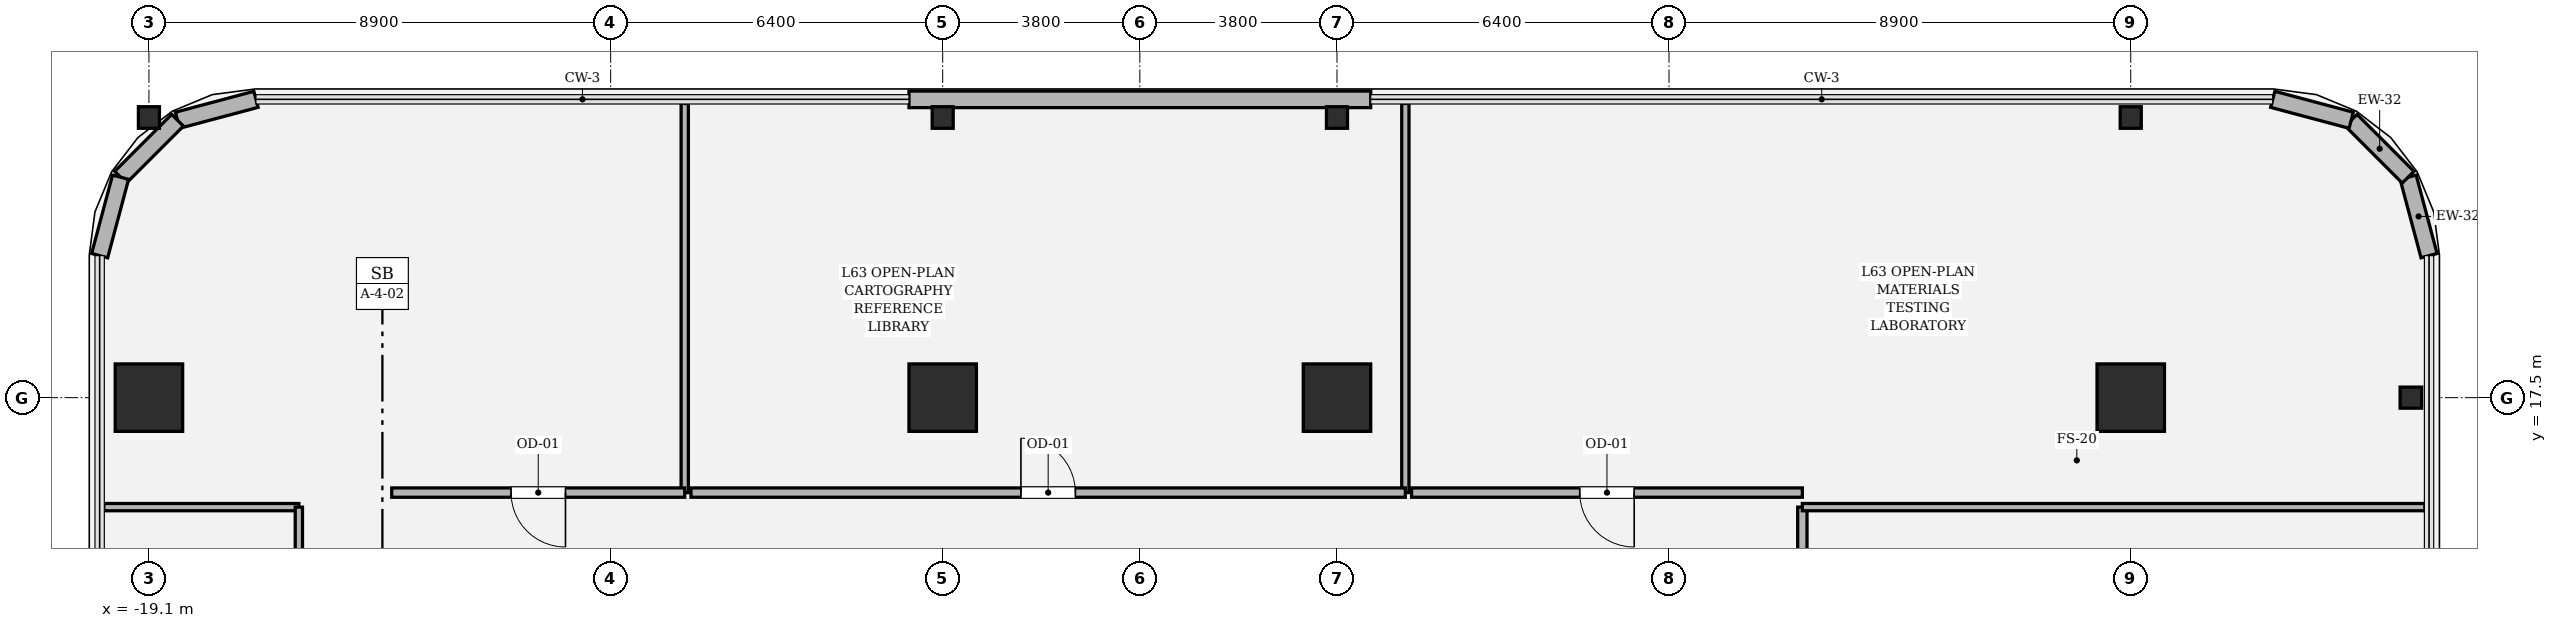
"""IFC4 building model, lengths in metres.
Left out: names, types, materials, properties, quantities, classifications, styles, units other than length and angle.
Written with IfcOpenShell. Run it as: python <this file> out.ifc"""

import sys

from ifc_helpers import new_model, si_unit, direction, frame, frame_2d, origin, origin_2d, place, context, subcontext, project, spatial, rectangle, hollow_rectangle, i_section, extrude, element, fill, save


model = new_model("IFC4")
c1 = context("Model", 3, precision=1e-05, world=origin(), true_north=direction((0.0, 1.0)))
c2 = subcontext(c1, "Body", "Model", "MODEL_VIEW")
j1 = project(units=[si_unit("LENGTHUNIT", "METRE"), si_unit("PLANEANGLEUNIT", "RADIAN")], contexts=[c1])
p1 = place(None, origin())
s1 = spatial("IfcSite", under=j1, at=p1, CompositionType="ELEMENT")
p2 = place(p1, origin())
s2 = spatial("IfcBuilding", under=s1, at=p2, CompositionType="ELEMENT")
p3 = place(p2, frame((0.0, 0.0, 267.6)))
s3 = spatial("IfcBuildingStorey", under=s2, at=p3, CompositionType="ELEMENT", Elevation=267.6)
for number, where, z_axis, x_axis in (
    (1, (19.1, 17.5, 0.0), (0.0, 0.0, 1.0), (1.0, 0.0, 0.0)),
    (2, (3.8, 17.5, 0.0), (0.0, 0.0, 1.0), (1.0, 0.0, 0.0)),
    (3, (-3.8, 17.5, 0.0), (0.0, 0.0, 1.0), (1.0, 0.0, 0.0)),
    (4, (-19.1, 17.5, 0.0), (0.0, 0.0, 1.0), (1.0, 0.0, 0.0)),
):
    element("IfcColumn", number, at=place(p3, frame(where, z_axis=z_axis, x_axis=x_axis)), inside=s3, PredefinedType="COLUMN", context=c2, shape_type="SweptSolid", body=[
        extrude(hollow_rectangle(XDim=1.3, YDim=1.3, WallThickness=0.038, at=origin_2d()), origin(), (0.0, 0.0, 1.0), 4.05),
    ])
for number, where, z_axis, x_axis in (
    (5, (-19.1, 22.9, 0.0), (0.0, 0.0, 1.0), (1.0, 0.0, 0.0)),
    (6, (-3.8, 22.9, 0.0), (0.0, 0.0, 1.0), (1.0, 0.0, 0.0)),
    (7, (3.8, 22.9, 0.0), (0.0, 0.0, 1.0), (1.0, 0.0, 0.0)),
    (8, (19.1, 22.9, 0.0), (0.0, 0.0, 1.0), (1.0, 0.0, 0.0)),
    (9, (24.5, 17.5, 0.0), (0.0, 0.0, 1.0), (0.0, 1.0, 0.0)),
):
    element("IfcColumn", number, at=place(p3, frame(where, z_axis=z_axis, x_axis=x_axis)), inside=s3, PredefinedType="COLUMN", context=c2, shape_type="SweptSolid", body=[
        extrude(i_section(OverallWidth=0.406, OverallDepth=0.416, WebThickness=0.029, FlangeThickness=0.048, FilletRadius=0.018, at=origin_2d()), origin(), (0.0, 0.0, 1.0), 4.048),
    ])
p4 = place(p3, frame((24.85, 20.237, 0.0), z_axis=(0.0, 0.0, 1.0), x_axis=(-0.257847112249, 0.966185730957, 0.0)))
e10 = element("IfcWall", 10, at=p4, inside=s3, PredefinedType="SOLIDWALL", context=c2, shape_type="SweptSolid", body=[
    extrude(rectangle(XDim=1.565, YDim=0.32, at=frame_2d((0.783, 0.0))), origin(), (0.0, 0.0, 1.0), 3.85),
])
p5 = place(p3, frame((24.447, 21.749, 0.0), z_axis=(0.0, 0.0, 1.0), x_axis=(-0.707028130747, 0.707185422879, 0.0)))
e11 = element("IfcWall", 11, at=p5, inside=s3, PredefinedType="SOLIDWALL", context=c2, shape_type="SweptSolid", body=[
    extrude(rectangle(XDim=1.552, YDim=0.32, at=frame_2d((0.776, 0.0))), origin(), (0.0, 0.0, 1.0), 3.85),
])
p6 = place(p3, frame((23.349, 22.847, 0.0), z_axis=(0.0, 0.0, 1.0), x_axis=(-0.966224582397, 0.257701486942, 0.0)))
e12 = element("IfcWall", 12, at=p6, inside=s3, PredefinedType="SOLIDWALL", context=c2, shape_type="SweptSolid", body=[
    extrude(rectangle(XDim=1.565, YDim=0.32, at=frame_2d((0.783, 0.0))), origin(), (0.0, 0.0, 1.0), 3.85),
])
p7 = place(p3, frame((4.45, 23.25, 0.0), z_axis=(0.0, 0.0, 1.0), x_axis=(-1.0, 0.0, 0.0)))
e13 = element("IfcWall", 13, at=p7, inside=s3, PredefinedType="SOLIDWALL", context=c2, shape_type="SweptSolid", body=[
    extrude(rectangle(XDim=8.9, YDim=0.32, at=frame_2d((4.45, 0.0))), origin(), (0.0, 0.0, 1.0), 2.564),
])
p8 = place(p3, frame((-17.037, 23.25, 0.0), z_axis=(0.0, 0.0, 1.0), x_axis=(-0.966224582397, -0.257701486942, 0.0)))
e14 = element("IfcWall", 14, at=p8, inside=s3, PredefinedType="SOLIDWALL", context=c2, shape_type="SweptSolid", body=[
    extrude(rectangle(XDim=1.565, YDim=0.32, at=frame_2d((0.783, 0.0))), origin(), (0.0, 0.0, 1.0), 2.564),
])
p9 = place(p3, frame((-18.549, 22.847, 0.0), z_axis=(0.0, 0.0, 1.0), x_axis=(-0.707028130747, -0.707185422879, 0.0)))
e15 = element("IfcWall", 15, at=p9, inside=s3, PredefinedType="SOLIDWALL", context=c2, shape_type="SweptSolid", body=[
    extrude(rectangle(XDim=1.552, YDim=0.32, at=frame_2d((0.776, 0.0))), origin(), (0.0, 0.0, 1.0), 2.524),
])
p10 = place(p3, frame((-19.646, 21.749, 0.0), z_axis=(0.0, 0.0, 1.0), x_axis=(-0.257847112249, -0.966185730957, 0.0)))
e16 = element("IfcWall", 16, at=p10, inside=s3, PredefinedType="SOLIDWALL", context=c2, shape_type="SweptSolid", body=[
    extrude(rectangle(XDim=1.565, YDim=0.32, at=frame_2d((0.783, 0.0))), origin(), (0.0, 0.0, 1.0), 3.85),
])
p11 = place(p3, frame((12.77, 13.38, 0.0), z_axis=(0.0, 0.0, 1.0), x_axis=(0.0, 1.0, 0.0)))
e17 = element("IfcWall", 17, at=p11, inside=s3, PredefinedType="PARTITIONING", context=c2, shape_type="SweptSolid", body=[
    extrude(rectangle(XDim=2.01, YDim=0.18, at=frame_2d((1.005, 0.0))), origin(), (0.0, 0.0, 1.0), 3.484),
])
p12 = place(p3, frame((12.77, 15.39, 0.0), z_axis=(0.0, 0.0, 1.0), x_axis=(1.0, 0.0, 0.0)))
e18 = element("IfcWall", 18, at=p12, inside=s3, PredefinedType="PARTITIONING", context=c2, shape_type="SweptSolid", body=[
    extrude(rectangle(XDim=12.0, YDim=0.14, at=frame_2d((6.0, 0.0))), origin(), (0.0, 0.0, 1.0), 2.564),
])
p13 = place(p3, frame((-19.97, 15.39, 0.0), z_axis=(0.0, 0.0, 1.0), x_axis=(1.0, 0.0, 0.0)))
e19 = element("IfcWall", 19, at=p13, inside=s3, PredefinedType="PARTITIONING", context=c2, shape_type="SweptSolid", body=[
    extrude(rectangle(XDim=3.76, YDim=0.14, at=frame_2d((1.88, 0.0))), origin(), (0.0, 0.0, 1.0), 3.244),
])
p14 = place(p3, frame((-16.21, 15.39, 0.0), z_axis=(0.0, 0.0, 1.0), x_axis=(0.0, -1.0, 0.0)))
e20 = element("IfcWall", 20, at=p14, inside=s3, PredefinedType="PARTITIONING", context=c2, shape_type="SweptSolid", body=[
    extrude(rectangle(XDim=1.57, YDim=0.14, at=frame_2d((0.785, 0.0))), origin(), (0.0, 0.0, 1.0), 3.85),
])
p15 = place(p3, frame((-8.772, 23.17, 0.0), z_axis=(0.0, 0.0, 1.0), x_axis=(0.0, -1.0, 0.0)))
e21 = element("IfcWall", 21, at=p15, inside=s3, PredefinedType="PARTITIONING", context=c2, shape_type="SweptSolid", body=[
    extrude(rectangle(XDim=7.5, YDim=0.14, at=frame_2d((3.75, 0.0))), origin(), (0.0, 0.0, 1.0), 2.564),
])
p16 = place(p3, frame((-8.772, 15.67, 0.0), z_axis=(0.0, 0.0, 1.0), x_axis=(-1.0, 0.0, 0.0)))
e22 = element("IfcWall", 22, at=p16, inside=s3, PredefinedType="PARTITIONING", context=c2, shape_type="SweptSolid", body=[
    extrude(rectangle(XDim=5.648, YDim=0.18, at=frame_2d((2.824, 0.0))), origin(), (0.0, 0.0, 1.0), 3.244),
])
p17 = place(p16, frame((2.299, 0.0, 0.0)))
e23 = element("IfcOpeningElement", 23, at=p17, cuts=e22, PredefinedType="OPENING", context=c2, shape_type="SweptSolid", body=[
    extrude(rectangle(XDim=1.05, YDim=2.2, at=frame_2d((0.525, 1.1))), frame((0.0, 0.1, 0.0), z_axis=(0.0, -1.0, 0.0), x_axis=(1.0, 0.0, 0.0)), (0.0, 0.0, 1.0), 0.2),
])
p18 = place(p3, frame((5.118, 23.17, 0.0), z_axis=(0.0, 0.0, 1.0), x_axis=(0.0, -1.0, 0.0)))
e24 = element("IfcWall", 24, at=p18, inside=s3, PredefinedType="PARTITIONING", context=c2, shape_type="SweptSolid", body=[
    extrude(rectangle(XDim=7.5, YDim=0.14, at=frame_2d((3.75, 0.0))), origin(), (0.0, 0.0, 1.0), 2.564),
])
p19 = place(p3, frame((5.118, 15.67, 0.0), z_axis=(0.0, 0.0, 1.0), x_axis=(-1.0, 0.0, 0.0)))
e25 = element("IfcWall", 25, at=p19, inside=s3, PredefinedType="PARTITIONING", context=c2, shape_type="SweptSolid", body=[
    extrude(rectangle(XDim=13.77, YDim=0.18, at=frame_2d((6.885, 0.0))), origin(), (0.0, 0.0, 1.0), 3.244),
])
p20 = place(p19, frame((6.36, 0.0, 0.0)))
e26 = element("IfcOpeningElement", 26, at=p20, cuts=e25, PredefinedType="OPENING", context=c2, shape_type="SweptSolid", body=[
    extrude(rectangle(XDim=1.05, YDim=2.2, at=frame_2d((0.525, 1.1))), frame((0.0, 0.1, 0.0), z_axis=(0.0, -1.0, 0.0), x_axis=(1.0, 0.0, 0.0)), (0.0, 0.0, 1.0), 0.2),
])
p21 = place(p3, frame((12.77, 15.67, 0.0), z_axis=(0.0, 0.0, 1.0), x_axis=(-1.0, 0.0, 0.0)))
e27 = element("IfcWall", 27, at=p21, inside=s3, PredefinedType="PARTITIONING", context=c2, shape_type="SweptSolid", body=[
    extrude(rectangle(XDim=7.532, YDim=0.18, at=frame_2d((3.766, 0.0))), origin(), (0.0, 0.0, 1.0), 3.244),
])
p22 = place(p21, frame((3.241, 0.0, 0.0)))
e28 = element("IfcOpeningElement", 28, at=p22, cuts=e27, PredefinedType="OPENING", context=c2, shape_type="SweptSolid", body=[
    extrude(rectangle(XDim=1.05, YDim=2.2, at=frame_2d((0.525, 1.1))), frame((0.0, 0.1, 0.0), z_axis=(0.0, -1.0, 0.0), x_axis=(1.0, 0.0, 0.0)), (0.0, 0.0, 1.0), 0.2),
])
p23 = place(p17, origin())
e29 = element("IfcDoor", 29, at=p23, inside=s3, OperationType="SINGLE_SWING_LEFT", PredefinedType="DOOR", context=c2, shape_type="SweptSolid", body=[
    extrude(rectangle(XDim=1.05, YDim=2.2, at=frame_2d((0.525, 1.1))), frame((0.0, 0.025, 0.0), z_axis=(0.0, -1.0, 0.0), x_axis=(1.0, 0.0, 0.0)), (0.0, 0.0, 1.0), 0.05),
])
fill(e23, e29)
p24 = place(p20, origin())
e30 = element("IfcDoor", 30, at=p24, inside=s3, OperationType="SINGLE_SWING_RIGHT", PredefinedType="DOOR", context=c2, shape_type="SweptSolid", body=[
    extrude(rectangle(XDim=1.05, YDim=2.2, at=frame_2d((0.525, 1.1))), frame((0.0, 0.025, 0.0), z_axis=(0.0, -1.0, 0.0), x_axis=(1.0, 0.0, 0.0)), (0.0, 0.0, 1.0), 0.05),
])
fill(e26, e30)
p25 = place(p22, origin())
e31 = element("IfcDoor", 31, at=p25, inside=s3, OperationType="SINGLE_SWING_LEFT", PredefinedType="DOOR", context=c2, shape_type="SweptSolid", body=[
    extrude(rectangle(XDim=1.05, YDim=2.2, at=frame_2d((0.525, 1.1))), frame((0.0, 0.025, 0.0), z_axis=(0.0, -1.0, 0.0), x_axis=(1.0, 0.0, 0.0)), (0.0, 0.0, 1.0), 0.05),
])
fill(e28, e31)
save(model, sys.argv[1])
